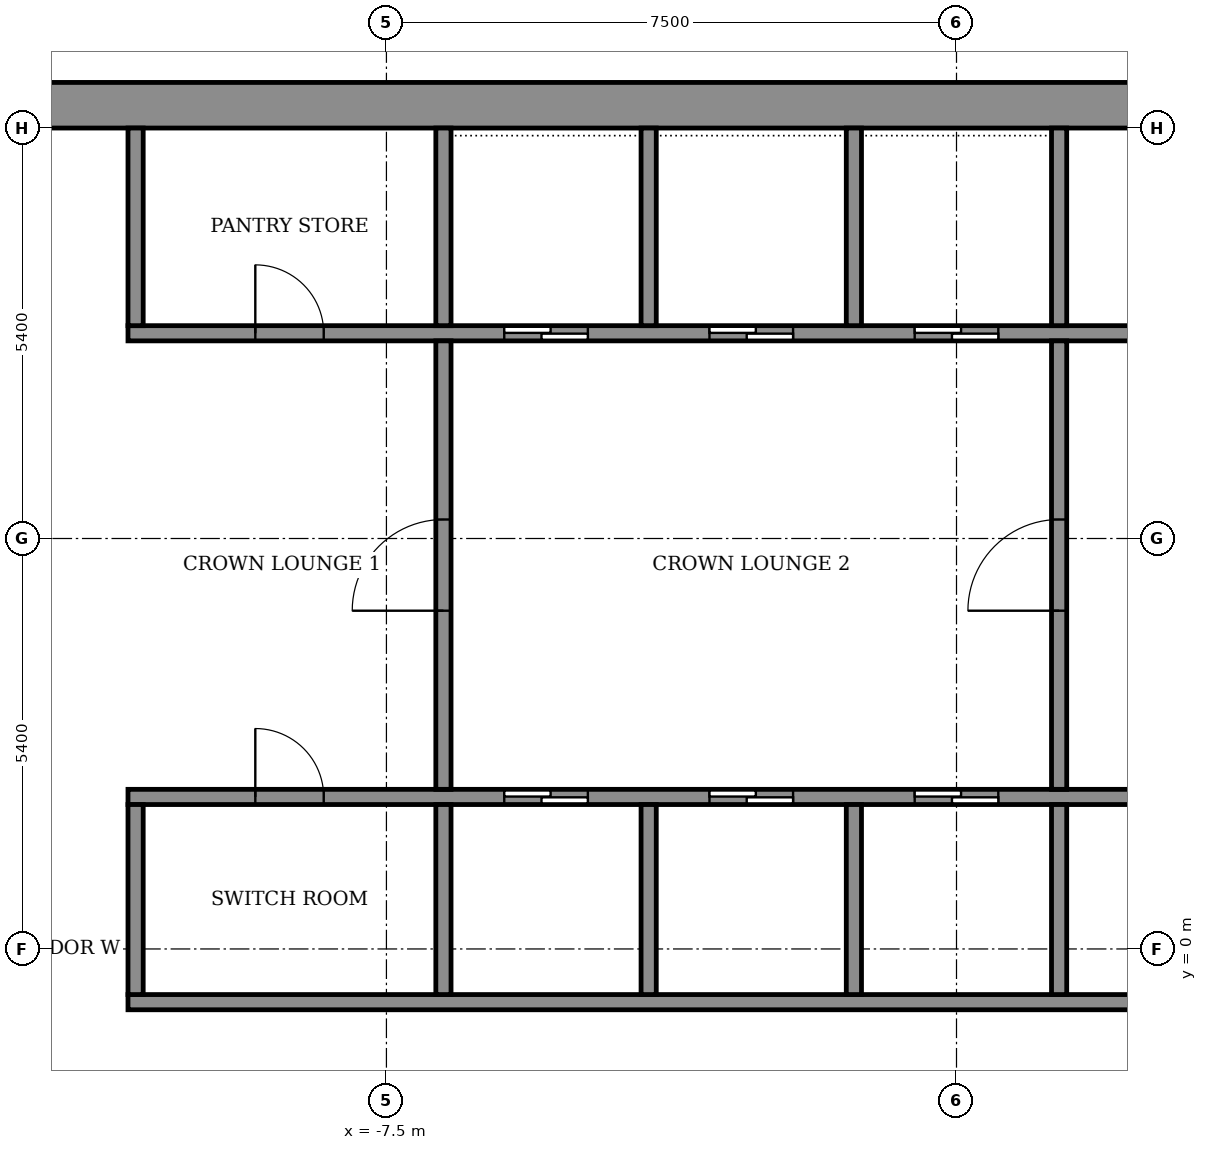
"""IFC4 building model, lengths in metres.
Left out: names, types, materials, properties, quantities, classifications, styles, units other than length and angle.
Written with IfcOpenShell. Run it as: python <this file> out.ifc"""

import sys

from ifc_helpers import new_model, si_unit, direction, frame, frame_2d, origin, place, context, subcontext, project, spatial, rectangle, extrude, element, fill, save


model = new_model("IFC4")
c1 = context("Model", 3, precision=1e-05, world=origin(), true_north=direction((0.0, 1.0)))
c2 = subcontext(c1, "Body", "Model", "MODEL_VIEW")
j1 = project(units=[si_unit("LENGTHUNIT", "METRE"), si_unit("PLANEANGLEUNIT", "RADIAN")], contexts=[c1])
p1 = place(None, origin())
s1 = spatial("IfcSite", under=j1, at=p1, CompositionType="ELEMENT")
p2 = place(p1, origin())
s2 = spatial("IfcBuilding", under=s1, at=p2, CompositionType="ELEMENT")
p3 = place(p2, frame((0.0, 0.0, 334.3)))
s3 = spatial("IfcBuildingStorey", under=s2, at=p3, CompositionType="ELEMENT", Elevation=334.3)
p4 = place(p3, frame((-14.4, 11.1, 0.0), z_axis=(0.0, 0.0, 1.0), x_axis=(1.0, 0.0, 0.0)))
e1 = element("IfcWall", 1, at=p4, inside=s3, PredefinedType="SHEAR", context=c2, shape_type="SweptSolid", body=[
    extrude(rectangle(XDim=28.8, YDim=0.6, at=frame_2d((14.4, 0.0))), origin(), (0.0, 0.0, 1.0), 3.6),
])
p5 = place(p3, frame((-10.9, -0.7, 0.0), z_axis=(0.0, 0.0, 1.0), x_axis=(1.0, 0.0, 0.0)))
e2 = element("IfcWall", 2, at=p5, inside=s3, PredefinedType="SHEAR", context=c2, shape_type="SweptSolid", body=[
    extrude(rectangle(XDim=21.8, YDim=0.2, at=frame_2d((10.9, 0.0))), origin(), (0.0, 0.0, 1.0), 3.05),
])
p6 = place(p3, frame((-10.9, 2.0, 0.0), z_axis=(0.0, 0.0, 1.0), x_axis=(1.0, 0.0, 0.0)))
e3 = element("IfcWall", 3, at=p6, inside=s3, PredefinedType="SHEAR", context=c2, shape_type="SweptSolid", body=[
    extrude(rectangle(XDim=21.8, YDim=0.2, at=frame_2d((10.9, 0.0))), origin(), (0.0, 0.0, 1.0), 3.05),
])
p7 = place(p6, frame((4.95, 0.0, 0.0)))
e4 = element("IfcOpeningElement", 4, at=p7, cuts=e3, PredefinedType="OPENING", context=c2, shape_type="SweptSolid", body=[
    extrude(rectangle(XDim=1.1, YDim=2.1, at=frame_2d((0.55, 1.05))), frame((0.0, 0.11, 0.0), z_axis=(0.0, -1.0, 0.0), x_axis=(1.0, 0.0, 0.0)), (0.0, 0.0, 1.0), 0.22),
])
p8 = place(p6, frame((7.65, 0.0, 0.0)))
e5 = element("IfcOpeningElement", 5, at=p8, cuts=e3, PredefinedType="OPENING", context=c2, shape_type="SweptSolid", body=[
    extrude(rectangle(XDim=1.1, YDim=2.1, at=frame_2d((0.55, 1.05))), frame((0.0, 0.11, 0.0), z_axis=(0.0, -1.0, 0.0), x_axis=(1.0, 0.0, 0.0)), (0.0, 0.0, 1.0), 0.22),
])
p9 = place(p6, frame((10.35, 0.0, 0.0)))
e6 = element("IfcOpeningElement", 6, at=p9, cuts=e3, PredefinedType="OPENING", context=c2, shape_type="SweptSolid", body=[
    extrude(rectangle(XDim=1.1, YDim=2.1, at=frame_2d((0.55, 1.05))), frame((0.0, 0.11, 0.0), z_axis=(0.0, -1.0, 0.0), x_axis=(1.0, 0.0, 0.0)), (0.0, 0.0, 1.0), 0.22),
])
p10 = place(p6, frame((1.675, 0.0, 0.0)))
e7 = element("IfcOpeningElement", 7, at=p10, cuts=e3, PredefinedType="OPENING", context=c2, shape_type="SweptSolid", body=[
    extrude(rectangle(XDim=0.9, YDim=2.1, at=frame_2d((0.45, 1.05))), frame((0.0, 0.11, 0.0), z_axis=(0.0, -1.0, 0.0), x_axis=(1.0, 0.0, 0.0)), (0.0, 0.0, 1.0), 0.22),
])
p11 = place(p6, frame((14.5, 0.0, 0.0)))
e8 = element("IfcOpeningElement", 8, at=p11, cuts=e3, PredefinedType="OPENING", context=c2, shape_type="SweptSolid", body=[
    extrude(rectangle(XDim=0.9, YDim=2.1, at=frame_2d((0.45, 1.05))), frame((0.0, 0.11, 0.0), z_axis=(0.0, -1.0, 0.0), x_axis=(1.0, 0.0, 0.0)), (0.0, 0.0, 1.0), 0.22),
])
p12 = place(p6, frame((19.225, 0.0, 0.0)))
e9 = element("IfcOpeningElement", 9, at=p12, cuts=e3, PredefinedType="OPENING", context=c2, shape_type="SweptSolid", body=[
    extrude(rectangle(XDim=0.9, YDim=2.1, at=frame_2d((0.45, 1.05))), frame((0.0, 0.11, 0.0), z_axis=(0.0, -1.0, 0.0), x_axis=(1.0, 0.0, 0.0)), (0.0, 0.0, 1.0), 0.22),
])
p13 = place(p3, frame((-10.9, 8.1, 0.0), z_axis=(0.0, 0.0, 1.0), x_axis=(1.0, 0.0, 0.0)))
e10 = element("IfcWall", 10, at=p13, inside=s3, PredefinedType="SHEAR", context=c2, shape_type="SweptSolid", body=[
    extrude(rectangle(XDim=21.8, YDim=0.2, at=frame_2d((10.9, 0.0))), origin(), (0.0, 0.0, 1.0), 3.05),
])
p14 = place(p13, frame((4.95, 0.0, 0.0)))
e11 = element("IfcOpeningElement", 11, at=p14, cuts=e10, PredefinedType="OPENING", context=c2, shape_type="SweptSolid", body=[
    extrude(rectangle(XDim=1.1, YDim=2.1, at=frame_2d((0.55, 1.05))), frame((0.0, 0.11, 0.0), z_axis=(0.0, -1.0, 0.0), x_axis=(1.0, 0.0, 0.0)), (0.0, 0.0, 1.0), 0.22),
])
p15 = place(p13, frame((7.65, 0.0, 0.0)))
e12 = element("IfcOpeningElement", 12, at=p15, cuts=e10, PredefinedType="OPENING", context=c2, shape_type="SweptSolid", body=[
    extrude(rectangle(XDim=1.1, YDim=2.1, at=frame_2d((0.55, 1.05))), frame((0.0, 0.11, 0.0), z_axis=(0.0, -1.0, 0.0), x_axis=(1.0, 0.0, 0.0)), (0.0, 0.0, 1.0), 0.22),
])
p16 = place(p13, frame((10.35, 0.0, 0.0)))
e13 = element("IfcOpeningElement", 13, at=p16, cuts=e10, PredefinedType="OPENING", context=c2, shape_type="SweptSolid", body=[
    extrude(rectangle(XDim=1.1, YDim=2.1, at=frame_2d((0.55, 1.05))), frame((0.0, 0.11, 0.0), z_axis=(0.0, -1.0, 0.0), x_axis=(1.0, 0.0, 0.0)), (0.0, 0.0, 1.0), 0.22),
])
p17 = place(p13, frame((1.675, 0.0, 0.0)))
e14 = element("IfcOpeningElement", 14, at=p17, cuts=e10, PredefinedType="OPENING", context=c2, shape_type="SweptSolid", body=[
    extrude(rectangle(XDim=0.9, YDim=2.1, at=frame_2d((0.45, 1.05))), frame((0.0, 0.11, 0.0), z_axis=(0.0, -1.0, 0.0), x_axis=(1.0, 0.0, 0.0)), (0.0, 0.0, 1.0), 0.22),
])
p18 = place(p13, frame((14.5, 0.0, 0.0)))
e15 = element("IfcOpeningElement", 15, at=p18, cuts=e10, PredefinedType="OPENING", context=c2, shape_type="SweptSolid", body=[
    extrude(rectangle(XDim=0.9, YDim=2.1, at=frame_2d((0.45, 1.05))), frame((0.0, 0.11, 0.0), z_axis=(0.0, -1.0, 0.0), x_axis=(1.0, 0.0, 0.0)), (0.0, 0.0, 1.0), 0.22),
])
p19 = place(p13, frame((19.225, 0.0, 0.0)))
e16 = element("IfcOpeningElement", 16, at=p19, cuts=e10, PredefinedType="OPENING", context=c2, shape_type="SweptSolid", body=[
    extrude(rectangle(XDim=0.9, YDim=2.1, at=frame_2d((0.45, 1.05))), frame((0.0, 0.11, 0.0), z_axis=(0.0, -1.0, 0.0), x_axis=(1.0, 0.0, 0.0)), (0.0, 0.0, 1.0), 0.22),
])
p20 = place(p3, frame((-10.8, -0.6, 0.0), z_axis=(0.0, 0.0, 1.0), x_axis=(0.0, 1.0, 0.0)))
e17 = element("IfcWall", 17, at=p20, inside=s3, PredefinedType="STANDARD", context=c2, shape_type="SweptSolid", body=[
    extrude(rectangle(XDim=2.5, YDim=0.2, at=frame_2d((1.25, 0.0))), origin(), (0.0, 0.0, 1.0), 3.05),
])
for number, where, z_axis, x_axis in (
    (18, (-6.75, -0.6, 0.0), (0.0, 0.0, 1.0), (0.0, 1.0, 0.0)),
    (19, (-4.05, -0.6, 0.0), (0.0, 0.0, 1.0), (0.0, 1.0, 0.0)),
    (20, (-1.35, -0.6, 0.0), (0.0, 0.0, 1.0), (0.0, 1.0, 0.0)),
    (21, (1.35, -0.6, 0.0), (0.0, 0.0, 1.0), (0.0, 1.0, 0.0)),
):
    element("IfcWall", number, at=place(p3, frame(where, z_axis=z_axis, x_axis=x_axis)), inside=s3, PredefinedType="SHEAR", context=c2, shape_type="SweptSolid", body=[
        extrude(rectangle(XDim=2.5, YDim=0.2, at=frame_2d((1.25, 0.0))), origin(), (0.0, 0.0, 1.0), 3.05),
    ])
p21 = place(p3, frame((-10.8, 8.2, 0.0), z_axis=(0.0, 0.0, 1.0), x_axis=(0.0, 1.0, 0.0)))
e22 = element("IfcWall", 22, at=p21, inside=s3, PredefinedType="STANDARD", context=c2, shape_type="SweptSolid", body=[
    extrude(rectangle(XDim=2.6, YDim=0.2, at=frame_2d((1.3, 0.0))), origin(), (0.0, 0.0, 1.0), 3.05),
])
for number, where, z_axis, x_axis in (
    (23, (-6.75, 8.2, 0.0), (0.0, 0.0, 1.0), (0.0, 1.0, 0.0)),
    (24, (-4.05, 8.2, 0.0), (0.0, 0.0, 1.0), (0.0, 1.0, 0.0)),
    (25, (-1.35, 8.2, 0.0), (0.0, 0.0, 1.0), (0.0, 1.0, 0.0)),
    (26, (1.35, 8.2, 0.0), (0.0, 0.0, 1.0), (0.0, 1.0, 0.0)),
):
    element("IfcWall", number, at=place(p3, frame(where, z_axis=z_axis, x_axis=x_axis)), inside=s3, PredefinedType="SHEAR", context=c2, shape_type="SweptSolid", body=[
        extrude(rectangle(XDim=2.6, YDim=0.2, at=frame_2d((1.3, 0.0))), origin(), (0.0, 0.0, 1.0), 3.05),
    ])
p22 = place(p3, frame((-6.75, 2.1, 0.0), z_axis=(0.0, 0.0, 1.0), x_axis=(0.0, 1.0, 0.0)))
e27 = element("IfcWall", 27, at=p22, inside=s3, PredefinedType="STANDARD", context=c2, shape_type="SweptSolid", body=[
    extrude(rectangle(XDim=5.9, YDim=0.2, at=frame_2d((2.95, 0.0))), origin(), (0.0, 0.0, 1.0), 3.05),
])
p23 = place(p22, frame((2.35, 0.0, 0.0)))
e28 = element("IfcOpeningElement", 28, at=p23, cuts=e27, PredefinedType="OPENING", context=c2, shape_type="SweptSolid", body=[
    extrude(rectangle(XDim=1.2, YDim=2.1, at=frame_2d((0.6, 1.05))), frame((0.0, 0.11, 0.0), z_axis=(0.0, -1.0, 0.0), x_axis=(1.0, 0.0, 0.0)), (0.0, 0.0, 1.0), 0.22),
])
p24 = place(p3, frame((1.35, 2.1, 0.0), z_axis=(0.0, 0.0, 1.0), x_axis=(0.0, 1.0, 0.0)))
e29 = element("IfcWall", 29, at=p24, inside=s3, PredefinedType="STANDARD", context=c2, shape_type="SweptSolid", body=[
    extrude(rectangle(XDim=5.9, YDim=0.2, at=frame_2d((2.95, 0.0))), origin(), (0.0, 0.0, 1.0), 3.05),
])
p25 = place(p24, frame((2.35, 0.0, 0.0)))
e30 = element("IfcOpeningElement", 30, at=p25, cuts=e29, PredefinedType="OPENING", context=c2, shape_type="SweptSolid", body=[
    extrude(rectangle(XDim=1.2, YDim=2.1, at=frame_2d((0.6, 1.05))), frame((0.0, 0.11, 0.0), z_axis=(0.0, -1.0, 0.0), x_axis=(1.0, 0.0, 0.0)), (0.0, 0.0, 1.0), 0.22),
])
p26 = place(p7, origin())
e31 = element("IfcDoor", 31, at=p26, inside=s3, OperationType="SLIDING_TO_LEFT", PredefinedType="DOOR", context=c2, shape_type="SweptSolid", body=[
    extrude(rectangle(XDim=1.1, YDim=2.1, at=frame_2d((0.55, 1.05))), frame((0.0, 0.025, 0.0), z_axis=(0.0, -1.0, 0.0), x_axis=(1.0, 0.0, 0.0)), (0.0, 0.0, 1.0), 0.05),
])
fill(e4, e31)
p27 = place(p8, origin())
e32 = element("IfcDoor", 32, at=p27, inside=s3, OperationType="SLIDING_TO_LEFT", PredefinedType="DOOR", context=c2, shape_type="SweptSolid", body=[
    extrude(rectangle(XDim=1.1, YDim=2.1, at=frame_2d((0.55, 1.05))), frame((0.0, 0.025, 0.0), z_axis=(0.0, -1.0, 0.0), x_axis=(1.0, 0.0, 0.0)), (0.0, 0.0, 1.0), 0.05),
])
fill(e5, e32)
p28 = place(p9, origin())
e33 = element("IfcDoor", 33, at=p28, inside=s3, OperationType="SLIDING_TO_LEFT", PredefinedType="DOOR", context=c2, shape_type="SweptSolid", body=[
    extrude(rectangle(XDim=1.1, YDim=2.1, at=frame_2d((0.55, 1.05))), frame((0.0, 0.025, 0.0), z_axis=(0.0, -1.0, 0.0), x_axis=(1.0, 0.0, 0.0)), (0.0, 0.0, 1.0), 0.05),
])
fill(e6, e33)
p29 = place(p14, origin())
e34 = element("IfcDoor", 34, at=p29, inside=s3, OperationType="SLIDING_TO_LEFT", PredefinedType="DOOR", context=c2, shape_type="SweptSolid", body=[
    extrude(rectangle(XDim=1.1, YDim=2.1, at=frame_2d((0.55, 1.05))), frame((0.0, 0.025, 0.0), z_axis=(0.0, -1.0, 0.0), x_axis=(1.0, 0.0, 0.0)), (0.0, 0.0, 1.0), 0.05),
])
fill(e11, e34)
p30 = place(p15, origin())
e35 = element("IfcDoor", 35, at=p30, inside=s3, OperationType="SLIDING_TO_LEFT", PredefinedType="DOOR", context=c2, shape_type="SweptSolid", body=[
    extrude(rectangle(XDim=1.1, YDim=2.1, at=frame_2d((0.55, 1.05))), frame((0.0, 0.025, 0.0), z_axis=(0.0, -1.0, 0.0), x_axis=(1.0, 0.0, 0.0)), (0.0, 0.0, 1.0), 0.05),
])
fill(e12, e35)
p31 = place(p16, origin())
e36 = element("IfcDoor", 36, at=p31, inside=s3, OperationType="SLIDING_TO_LEFT", PredefinedType="DOOR", context=c2, shape_type="SweptSolid", body=[
    extrude(rectangle(XDim=1.1, YDim=2.1, at=frame_2d((0.55, 1.05))), frame((0.0, 0.025, 0.0), z_axis=(0.0, -1.0, 0.0), x_axis=(1.0, 0.0, 0.0)), (0.0, 0.0, 1.0), 0.05),
])
fill(e13, e36)
p32 = place(p10, origin())
e37 = element("IfcDoor", 37, at=p32, inside=s3, OperationType="SINGLE_SWING_LEFT", PredefinedType="DOOR", context=c2, shape_type="SweptSolid", body=[
    extrude(rectangle(XDim=0.9, YDim=2.1, at=frame_2d((0.45, 1.05))), frame((0.0, 0.025, 0.0), z_axis=(0.0, -1.0, 0.0), x_axis=(1.0, 0.0, 0.0)), (0.0, 0.0, 1.0), 0.05),
])
fill(e7, e37)
p33 = place(p17, origin())
e38 = element("IfcDoor", 38, at=p33, inside=s3, OperationType="SINGLE_SWING_RIGHT", PredefinedType="DOOR", context=c2, shape_type="SweptSolid", body=[
    extrude(rectangle(XDim=0.9, YDim=2.1, at=frame_2d((0.45, 1.05))), frame((0.0, 0.025, 0.0), z_axis=(0.0, -1.0, 0.0), x_axis=(1.0, 0.0, 0.0)), (0.0, 0.0, 1.0), 0.05),
])
fill(e14, e38)
p34 = place(p23, origin())
e39 = element("IfcDoor", 39, at=p34, inside=s3, OperationType="SINGLE_SWING_LEFT", PredefinedType="DOOR", context=c2, shape_type="SweptSolid", body=[
    extrude(rectangle(XDim=1.2, YDim=2.1, at=frame_2d((0.6, 1.05))), frame((0.0, 0.025, 0.0), z_axis=(0.0, -1.0, 0.0), x_axis=(1.0, 0.0, 0.0)), (0.0, 0.0, 1.0), 0.05),
])
fill(e28, e39)
p35 = place(p25, origin())
e40 = element("IfcDoor", 40, at=p35, inside=s3, OperationType="SINGLE_SWING_LEFT", PredefinedType="DOOR", context=c2, shape_type="SweptSolid", body=[
    extrude(rectangle(XDim=1.2, YDim=2.1, at=frame_2d((0.6, 1.05))), frame((0.0, 0.025, 0.0), z_axis=(0.0, -1.0, 0.0), x_axis=(1.0, 0.0, 0.0)), (0.0, 0.0, 1.0), 0.05),
])
fill(e30, e40)
save(model, sys.argv[1])
